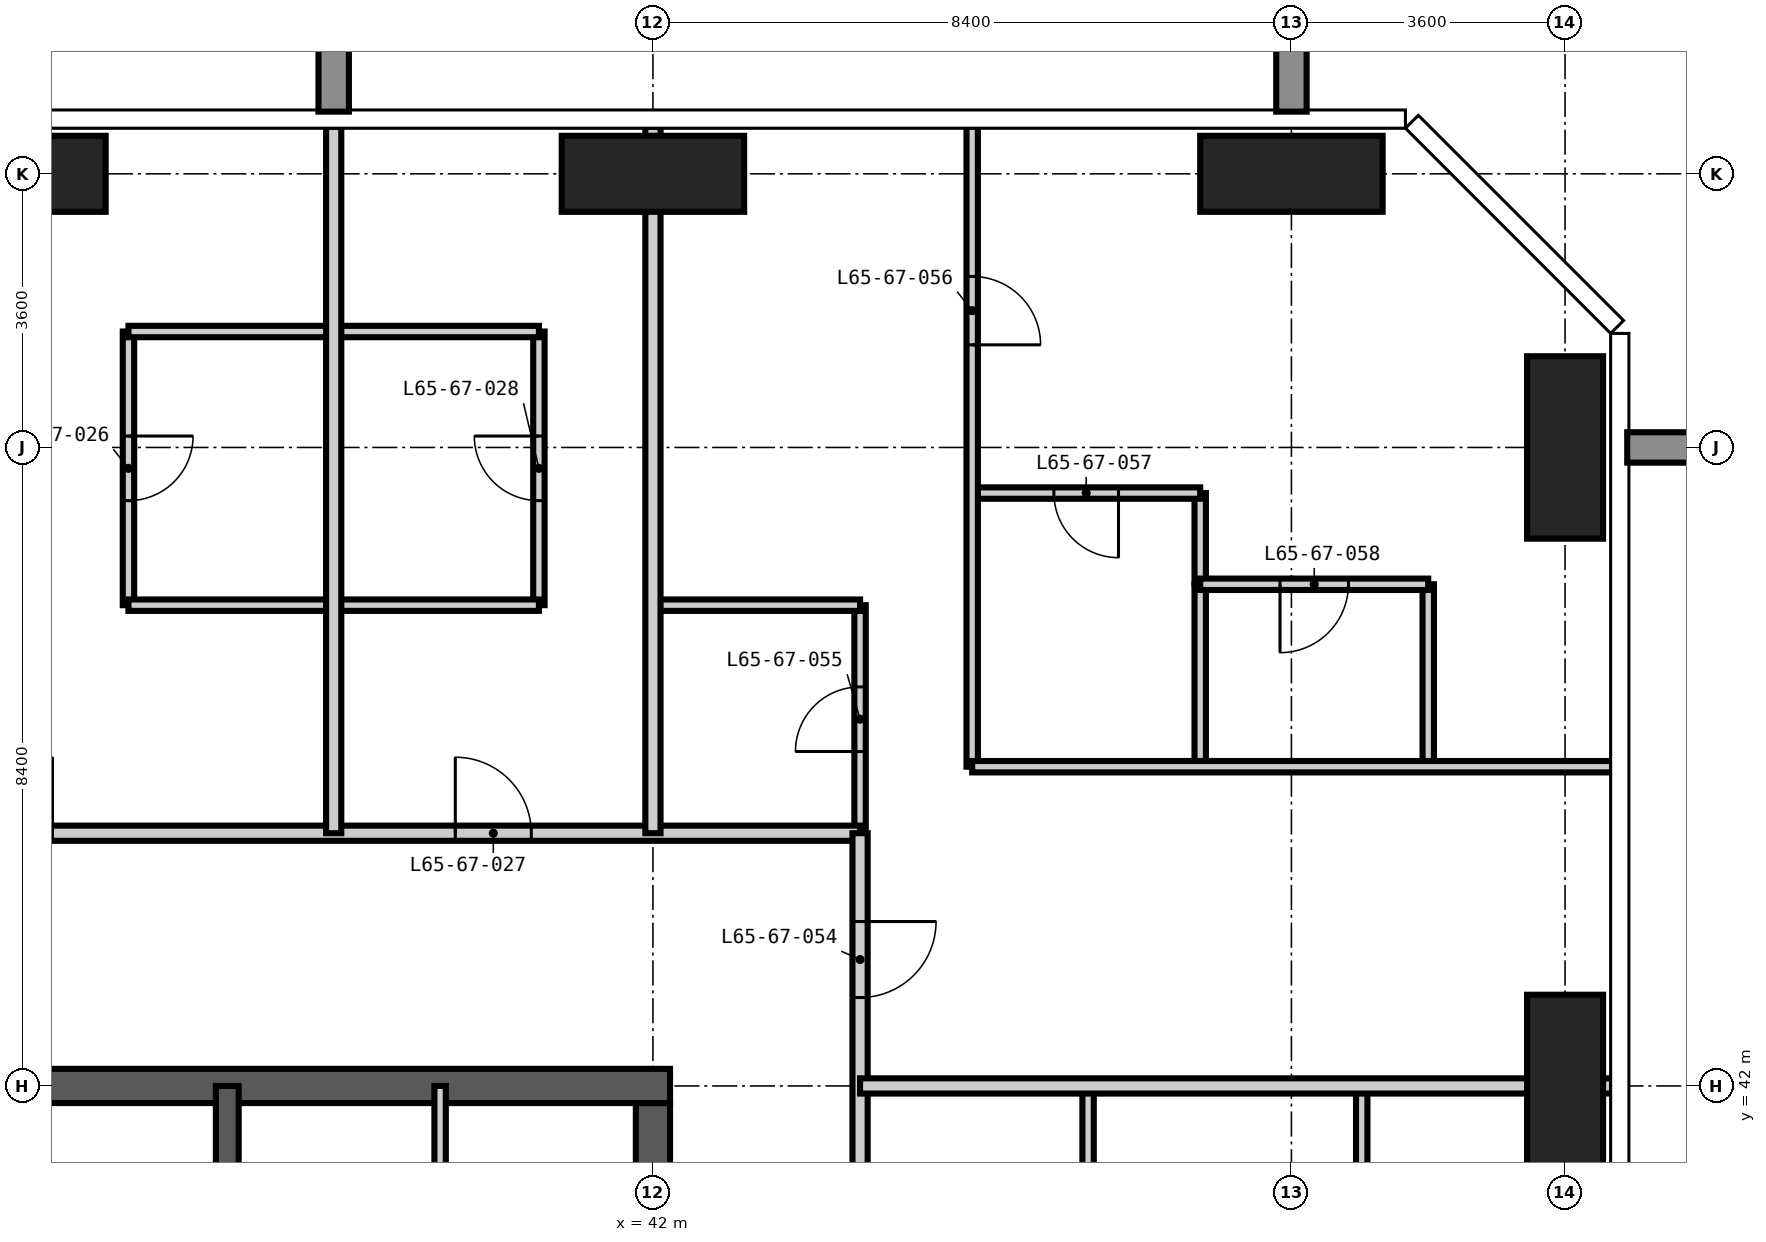
"""IFC4 building model, lengths in metres.
Left out: names, types, materials, properties, quantities, classifications, styles, units other than length and angle.
Written with IfcOpenShell. Run it as: python <this file> out.ifc"""

import sys

from ifc_helpers import new_model, si_unit, direction, frame, frame_2d, origin, origin_2d, place, context, subcontext, project, spatial, rectangle, extrude, element, fill, save


model = new_model("IFC4")
c1 = context("Model", 3, precision=1e-05, world=origin(), true_north=direction((0.0, 1.0)))
c2 = subcontext(c1, "Body", "Model", "MODEL_VIEW")
j1 = project(units=[si_unit("LENGTHUNIT", "METRE"), si_unit("PLANEANGLEUNIT", "RADIAN")], contexts=[c1])
p1 = place(None, origin())
s1 = spatial("IfcSite", under=j1, at=p1, CompositionType="ELEMENT")
p2 = place(p1, origin())
s2 = spatial("IfcBuilding", under=s1, at=p2, CompositionType="ELEMENT")
p3 = place(p2, frame((0.0, 0.0, 252.9)))
s3 = spatial("IfcBuildingStorey", under=s2, at=p3, CompositionType="ELEMENT", Elevation=252.9)
for number, where, z_axis, x_axis in (
    (1, (33.6, 54.0, -0.35), (0.0, 0.0, 1.0), (1.0, 0.0, 0.0)),
    (2, (42.0, 54.0, -0.35), (0.0, 0.0, 1.0), (1.0, 0.0, 0.0)),
    (3, (50.4, 54.0, -0.35), (0.0, 0.0, 1.0), (1.0, 0.0, 0.0)),
):
    element("IfcColumn", number, at=place(p3, frame(where, z_axis=z_axis, x_axis=x_axis)), inside=s3, PredefinedType="COLUMN", context=c2, shape_type="SweptSolid", body=[
        extrude(rectangle(XDim=2.4, YDim=1.0, at=origin_2d()), origin(), (0.0, 0.0, 1.0), 3.9),
    ])
for number, where, z_axis, x_axis in (
    (4, (54.0, 42.0, -0.35), (0.0, 0.0, 1.0), (1.0, 0.0, 0.0)),
    (5, (54.0, 50.4, -0.35), (0.0, 0.0, 1.0), (1.0, 0.0, 0.0)),
):
    element("IfcColumn", number, at=place(p3, frame(where, z_axis=z_axis, x_axis=x_axis)), inside=s3, PredefinedType="COLUMN", context=c2, shape_type="SweptSolid", body=[
        extrude(rectangle(XDim=1.0, YDim=2.4, at=origin_2d()), origin(), (0.0, 0.0, 1.0), 3.9),
    ])
p4 = place(p3, frame((42.0, 17.025, -0.35), z_axis=(0.0, 0.0, 1.0), x_axis=(0.0, 1.0, 0.0)))
e6 = element("IfcWall", 6, at=p4, inside=s3, PredefinedType="SHEAR", context=c2, shape_type="SweptSolid", body=[
    extrude(rectangle(XDim=24.75, YDim=0.45, at=frame_2d((12.375, 0.0))), origin(), (0.0, 0.0, 1.0), 3.9),
])
p5 = place(p4, frame((0.575, 0.0, 0.35)))
e7 = element("IfcOpeningElement", 7, at=p5, cuts=e6, PredefinedType="OPENING", context=c2, shape_type="SweptSolid", body=[
    extrude(rectangle(XDim=1.2, YDim=2.2, at=frame_2d((0.6, 1.1))), frame((0.0, 0.235, 0.0), z_axis=(0.0, -1.0, 0.0), x_axis=(1.0, 0.0, 0.0)), (0.0, 0.0, 1.0), 0.47),
])
p6 = place(p4, frame((11.475, 0.0, 0.35)))
e8 = element("IfcOpeningElement", 8, at=p6, cuts=e6, PredefinedType="OPENING", context=c2, shape_type="SweptSolid", body=[
    extrude(rectangle(XDim=1.8, YDim=2.2, at=frame_2d((0.9, 1.1))), frame((0.0, 0.235, 0.0), z_axis=(0.0, -1.0, 0.0), x_axis=(1.0, 0.0, 0.0)), (0.0, 0.0, 1.0), 0.47),
])
p7 = place(p4, frame((20.275, 0.0, 0.35)))
e9 = element("IfcOpeningElement", 9, at=p7, cuts=e6, PredefinedType="OPENING", context=c2, shape_type="SweptSolid", body=[
    extrude(rectangle(XDim=1.0, YDim=2.1, at=frame_2d((0.5, 1.05))), frame((0.0, 0.235, 0.0), z_axis=(0.0, -1.0, 0.0), x_axis=(1.0, 0.0, 0.0)), (0.0, 0.0, 1.0), 0.47),
])
p8 = place(p3, frame((42.225, 42.0, -0.35), z_axis=(0.0, 0.0, 1.0), x_axis=(-1.0, 0.0, 0.0)))
e10 = element("IfcWall", 10, at=p8, inside=s3, PredefinedType="SHEAR", context=c2, shape_type="SweptSolid", body=[
    extrude(rectangle(XDim=17.25, YDim=0.45, at=frame_2d((8.625, 0.0))), origin(), (0.0, 0.0, 1.0), 3.9),
])
p9 = place(p8, frame((10.125, 0.0, 0.35)))
e11 = element("IfcOpeningElement", 11, at=p9, cuts=e10, PredefinedType="OPENING", context=c2, shape_type="SweptSolid", body=[
    extrude(rectangle(XDim=1.2, YDim=2.2, at=frame_2d((0.6, 1.1))), frame((0.0, 0.235, 0.0), z_axis=(0.0, -1.0, 0.0), x_axis=(1.0, 0.0, 0.0)), (0.0, 0.0, 1.0), 0.47),
])
p10 = place(p3, frame((36.4, 33.6, -0.35), z_axis=(0.0, 0.0, 1.0), x_axis=(0.0, 1.0, 0.0)))
e12 = element("IfcWall", 12, at=p10, inside=s3, PredefinedType="SHEAR", context=c2, shape_type="SweptSolid", body=[
    extrude(rectangle(XDim=8.4, YDim=0.3, at=frame_2d((4.2, 0.0))), origin(), (0.0, 0.0, 1.0), 3.9),
])
p11 = place(p3, frame((35.1, 48.325, 0.0), z_axis=(0.0, 0.0, 1.0), x_axis=(0.0, 1.0, 0.0)))
e13 = element("IfcWall", 13, at=p11, inside=s3, PredefinedType="PARTITIONING", context=c2, shape_type="SweptSolid", body=[
    extrude(rectangle(XDim=3.6, YDim=0.15, at=frame_2d((1.8, 0.0))), origin(), (0.0, 0.0, 1.0), 3.55),
])
p12 = place(p11, frame((1.375, 0.0, 0.0)))
e14 = element("IfcOpeningElement", 14, at=p12, cuts=e13, PredefinedType="OPENING", context=c2, shape_type="SweptSolid", body=[
    extrude(rectangle(XDim=0.85, YDim=2.1, at=frame_2d((0.425, 1.05))), frame((0.0, 0.085, 0.0), z_axis=(0.0, -1.0, 0.0), x_axis=(1.0, 0.0, 0.0)), (0.0, 0.0, 1.0), 0.17),
])
p13 = place(p3, frame((40.5, 48.325, 0.0), z_axis=(0.0, 0.0, 1.0), x_axis=(0.0, 1.0, 0.0)))
e15 = element("IfcWall", 15, at=p13, inside=s3, PredefinedType="PARTITIONING", context=c2, shape_type="SweptSolid", body=[
    extrude(rectangle(XDim=3.6, YDim=0.15, at=frame_2d((1.8, 0.0))), origin(), (0.0, 0.0, 1.0), 3.55),
])
p14 = place(p13, frame((1.375, 0.0, 0.0)))
e16 = element("IfcOpeningElement", 16, at=p14, cuts=e15, PredefinedType="OPENING", context=c2, shape_type="SweptSolid", body=[
    extrude(rectangle(XDim=0.85, YDim=2.1, at=frame_2d((0.425, 1.05))), frame((0.0, 0.085, 0.0), z_axis=(0.0, -1.0, 0.0), x_axis=(1.0, 0.0, 0.0)), (0.0, 0.0, 1.0), 0.17),
])
p15 = place(p3, frame((44.725, 45.325, 0.0), z_axis=(0.0, 0.0, 1.0), x_axis=(0.0, 1.0, 0.0)))
e17 = element("IfcWall", 17, at=p15, inside=s3, PredefinedType="PARTITIONING", context=c2, shape_type="SweptSolid", body=[
    extrude(rectangle(XDim=3.0, YDim=0.15, at=frame_2d((1.5, 0.0))), origin(), (0.0, 0.0, 1.0), 3.55),
])
p16 = place(p15, frame((1.075, 0.0, 0.0)))
e18 = element("IfcOpeningElement", 18, at=p16, cuts=e17, PredefinedType="OPENING", context=c2, shape_type="SweptSolid", body=[
    extrude(rectangle(XDim=0.85, YDim=2.1, at=frame_2d((0.425, 1.05))), frame((0.0, 0.085, 0.0), z_axis=(0.0, -1.0, 0.0), x_axis=(1.0, 0.0, 0.0)), (0.0, 0.0, 1.0), 0.17),
])
p17 = place(p3, frame((47.725, 39.3, 0.0), z_axis=(0.0, 0.0, 1.0), x_axis=(0.0, 1.0, 0.0)))
e19 = element("IfcWall", 19, at=p17, inside=s3, PredefinedType="PARTITIONING", context=c2, shape_type="SweptSolid", body=[
    extrude(rectangle(XDim=2.7, YDim=0.15, at=frame_2d((1.35, 0.0))), origin(), (0.0, 0.0, 1.0), 3.55),
])
p18 = place(p3, frame((49.2, 48.6, 0.0), z_axis=(0.0, 0.0, 1.0), x_axis=(0.0, 1.0, 0.0)))
e20 = element("IfcWall", 20, at=p18, inside=s3, PredefinedType="PARTITIONING", context=c2, shape_type="SweptSolid", body=[
    extrude(rectangle(XDim=1.2, YDim=0.15, at=frame_2d((0.6, 0.0))), origin(), (0.0, 0.0, 1.0), 3.55),
])
p19 = place(p3, frame((51.325, 39.3, 0.0), z_axis=(0.0, 0.0, 1.0), x_axis=(0.0, 1.0, 0.0)))
e21 = element("IfcWall", 21, at=p19, inside=s3, PredefinedType="PARTITIONING", context=c2, shape_type="SweptSolid", body=[
    extrude(rectangle(XDim=2.7, YDim=0.15, at=frame_2d((1.35, 0.0))), origin(), (0.0, 0.0, 1.0), 3.55),
])
p20 = place(p3, frame((35.1, 48.325, 0.0), z_axis=(0.0, 0.0, 1.0), x_axis=(1.0, 0.0, 0.0)))
e22 = element("IfcWall", 22, at=p20, inside=s3, PredefinedType="PARTITIONING", context=c2, shape_type="SweptSolid", body=[
    extrude(rectangle(XDim=5.4, YDim=0.15, at=frame_2d((2.7, 0.0))), origin(), (0.0, 0.0, 1.0), 3.55),
])
p21 = place(p3, frame((42.0, 48.325, 0.0), z_axis=(0.0, 0.0, 1.0), x_axis=(1.0, 0.0, 0.0)))
e23 = element("IfcWall", 23, at=p21, inside=s3, PredefinedType="PARTITIONING", context=c2, shape_type="SweptSolid", body=[
    extrude(rectangle(XDim=2.725, YDim=0.15, at=frame_2d((1.363, 0.0))), origin(), (0.0, 0.0, 1.0), 3.55),
])
p22 = place(p3, frame((46.2, 49.8, 0.0), z_axis=(0.0, 0.0, 1.0), x_axis=(1.0, 0.0, 0.0)))
e24 = element("IfcWall", 24, at=p22, inside=s3, PredefinedType="PARTITIONING", context=c2, shape_type="SweptSolid", body=[
    extrude(rectangle(XDim=3.0, YDim=0.15, at=frame_2d((1.5, 0.0))), origin(), (0.0, 0.0, 1.0), 3.55),
])
p23 = place(p22, frame((1.075, 0.0, 0.0)))
e25 = element("IfcOpeningElement", 25, at=p23, cuts=e24, PredefinedType="OPENING", context=c2, shape_type="SweptSolid", body=[
    extrude(rectangle(XDim=0.85, YDim=2.1, at=frame_2d((0.425, 1.05))), frame((0.0, 0.085, 0.0), z_axis=(0.0, -1.0, 0.0), x_axis=(1.0, 0.0, 0.0)), (0.0, 0.0, 1.0), 0.17),
])
p24 = place(p3, frame((35.1, 51.925, 0.0), z_axis=(0.0, 0.0, 1.0), x_axis=(1.0, 0.0, 0.0)))
e26 = element("IfcWall", 26, at=p24, inside=s3, PredefinedType="PARTITIONING", context=c2, shape_type="SweptSolid", body=[
    extrude(rectangle(XDim=5.4, YDim=0.15, at=frame_2d((2.7, 0.0))), origin(), (0.0, 0.0, 1.0), 3.55),
])
p25 = place(p3, frame((23.075, 45.325, 0.0), z_axis=(0.0, 0.0, 1.0), x_axis=(1.0, 0.0, 0.0)))
e27 = element("IfcWall", 27, at=p25, inside=s3, PredefinedType="PARTITIONING", context=c2, shape_type="SweptSolid", body=[
    extrude(rectangle(XDim=21.65, YDim=0.2, at=frame_2d((10.825, 0.0))), origin(), (0.0, 0.0, 1.0), 3.55),
])
p26 = place(p25, frame((3.725, 0.0, 0.0)))
e28 = element("IfcOpeningElement", 28, at=p26, cuts=e27, PredefinedType="OPENING", context=c2, shape_type="SweptSolid", body=[
    extrude(rectangle(XDim=1.0, YDim=2.2, at=frame_2d((0.5, 1.1))), frame((0.0, 0.11, 0.0), z_axis=(0.0, -1.0, 0.0), x_axis=(1.0, 0.0, 0.0)), (0.0, 0.0, 1.0), 0.22),
])
p27 = place(p25, frame((10.025, 0.0, 0.0)))
e29 = element("IfcOpeningElement", 29, at=p27, cuts=e27, PredefinedType="OPENING", context=c2, shape_type="SweptSolid", body=[
    extrude(rectangle(XDim=1.0, YDim=2.2, at=frame_2d((0.5, 1.1))), frame((0.0, 0.11, 0.0), z_axis=(0.0, -1.0, 0.0), x_axis=(1.0, 0.0, 0.0)), (0.0, 0.0, 1.0), 0.22),
])
p28 = place(p25, frame((16.325, 0.0, 0.0)))
e30 = element("IfcOpeningElement", 30, at=p28, cuts=e27, PredefinedType="OPENING", context=c2, shape_type="SweptSolid", body=[
    extrude(rectangle(XDim=1.0, YDim=2.2, at=frame_2d((0.5, 1.1))), frame((0.0, 0.11, 0.0), z_axis=(0.0, -1.0, 0.0), x_axis=(1.0, 0.0, 0.0)), (0.0, 0.0, 1.0), 0.22),
])
p29 = place(p3, frame((44.725, 45.325, 0.0), z_axis=(0.0, 0.0, 1.0), x_axis=(0.0, -1.0, 0.0)))
e31 = element("IfcWall", 31, at=p29, inside=s3, PredefinedType="PARTITIONING", context=c2, shape_type="SweptSolid", body=[
    extrude(rectangle(XDim=11.725, YDim=0.2, at=frame_2d((5.862, 0.0))), origin(), (0.0, 0.0, 1.0), 3.55),
])
p30 = place(p29, frame((9.125, 0.0, 0.0)))
e32 = element("IfcOpeningElement", 32, at=p30, cuts=e31, PredefinedType="OPENING", context=c2, shape_type="SweptSolid", body=[
    extrude(rectangle(XDim=1.0, YDim=2.2, at=frame_2d((0.5, 1.1))), frame((0.0, 0.11, 0.0), z_axis=(0.0, -1.0, 0.0), x_axis=(1.0, 0.0, 0.0)), (0.0, 0.0, 1.0), 0.22),
])
p31 = place(p29, frame((4.925, 0.0, 0.0)))
e33 = element("IfcOpeningElement", 33, at=p31, cuts=e31, PredefinedType="OPENING", context=c2, shape_type="SweptSolid", body=[
    extrude(rectangle(XDim=1.0, YDim=2.2, at=frame_2d((0.5, 1.1))), frame((0.0, 0.11, 0.0), z_axis=(0.0, -1.0, 0.0), x_axis=(1.0, 0.0, 0.0)), (0.0, 0.0, 1.0), 0.22),
])
p32 = place(p29, frame((1.162, 0.0, 0.0)))
e34 = element("IfcOpeningElement", 34, at=p32, cuts=e31, PredefinedType="OPENING", context=c2, shape_type="SweptSolid", body=[
    extrude(rectangle(XDim=1.0, YDim=2.2, at=frame_2d((0.5, 1.1))), frame((0.0, 0.11, 0.0), z_axis=(0.0, -1.0, 0.0), x_axis=(1.0, 0.0, 0.0)), (0.0, 0.0, 1.0), 0.22),
])
for number, where, z_axis, x_axis in (
    (35, (37.8, 45.325, 0.0), (0.0, 0.0, 1.0), (0.0, 1.0, 0.0)),
    (36, (42.0, 45.325, 0.0), (0.0, 0.0, 1.0), (0.0, 1.0, 0.0)),
):
    element("IfcWall", number, at=place(p3, frame(where, z_axis=z_axis, x_axis=x_axis)), inside=s3, PredefinedType="PARTITIONING", context=c2, shape_type="SweptSolid", body=[
        extrude(rectangle(XDim=9.293, YDim=0.2, at=frame_2d((4.646, 0.0))), origin(), (0.0, 0.0, 1.0), 3.55),
    ])
p33 = place(p3, frame((44.725, 42.0, 0.0), z_axis=(0.0, 0.0, 1.0), x_axis=(1.0, 0.0, 0.0)))
e37 = element("IfcWall", 37, at=p33, inside=s3, PredefinedType="PARTITIONING", context=c2, shape_type="SweptSolid", body=[
    extrude(rectangle(XDim=9.893, YDim=0.2, at=frame_2d((4.946, 0.0))), origin(), (0.0, 0.0, 1.0), 3.55),
])
p34 = place(p3, frame((39.2, 33.6, 0.0), z_axis=(0.0, 0.0, 1.0), x_axis=(0.0, 1.0, 0.0)))
e38 = element("IfcWall", 38, at=p34, inside=s3, PredefinedType="PARTITIONING", context=c2, shape_type="SweptSolid", body=[
    extrude(rectangle(XDim=8.4, YDim=0.15, at=frame_2d((4.2, 0.0))), origin(), (0.0, 0.0, 1.0), 3.55),
])
p35 = place(p34, frame((3.7, 0.0, 0.0)))
e39 = element("IfcOpeningElement", 39, at=p35, cuts=e38, PredefinedType="OPENING", context=c2, shape_type="SweptSolid", body=[
    extrude(rectangle(XDim=1.0, YDim=2.1, at=frame_2d((0.5, 1.05))), frame((0.0, 0.085, 0.0), z_axis=(0.0, -1.0, 0.0), x_axis=(1.0, 0.0, 0.0)), (0.0, 0.0, 1.0), 0.17),
])
p36 = place(p3, frame((46.2, 46.2, 0.0), z_axis=(0.0, 0.0, 1.0), x_axis=(0.0, 1.0, 0.0)))
e40 = element("IfcWall", 40, at=p36, inside=s3, PredefinedType="PARTITIONING", context=c2, shape_type="SweptSolid", body=[
    extrude(rectangle(XDim=8.418, YDim=0.15, at=frame_2d((4.209, 0.0))), origin(), (0.0, 0.0, 1.0), 3.55),
])
p37 = place(p36, frame((5.55, 0.0, 0.0)))
e41 = element("IfcOpeningElement", 41, at=p37, cuts=e40, PredefinedType="OPENING", context=c2, shape_type="SweptSolid", body=[
    extrude(rectangle(XDim=0.9, YDim=2.1, at=frame_2d((0.45, 1.05))), frame((0.0, 0.085, 0.0), z_axis=(0.0, -1.0, 0.0), x_axis=(1.0, 0.0, 0.0)), (0.0, 0.0, 1.0), 0.17),
])
for number, where, z_axis, x_axis in (
    (42, (49.2, 46.2, 0.0), (0.0, 0.0, 1.0), (0.0, 1.0, 0.0)),
    (43, (52.2, 46.2, 0.0), (0.0, 0.0, 1.0), (0.0, 1.0, 0.0)),
):
    element("IfcWall", number, at=place(p3, frame(where, z_axis=z_axis, x_axis=x_axis)), inside=s3, PredefinedType="PARTITIONING", context=c2, shape_type="SweptSolid", body=[
        extrude(rectangle(XDim=2.4, YDim=0.15, at=frame_2d((1.2, 0.0))), origin(), (0.0, 0.0, 1.0), 3.55),
    ])
p38 = place(p3, frame((46.2, 46.2, 0.0), z_axis=(0.0, 0.0, 1.0), x_axis=(1.0, 0.0, 0.0)))
e44 = element("IfcWall", 44, at=p38, inside=s3, PredefinedType="PARTITIONING", context=c2, shape_type="SweptSolid", body=[
    extrude(rectangle(XDim=8.418, YDim=0.15, at=frame_2d((4.209, 0.0))), origin(), (0.0, 0.0, 1.0), 3.55),
])
p39 = place(p3, frame((49.2, 48.6, 0.0), z_axis=(0.0, 0.0, 1.0), x_axis=(1.0, 0.0, 0.0)))
e45 = element("IfcWall", 45, at=p39, inside=s3, PredefinedType="PARTITIONING", context=c2, shape_type="SweptSolid", body=[
    extrude(rectangle(XDim=3.0, YDim=0.15, at=frame_2d((1.5, 0.0))), origin(), (0.0, 0.0, 1.0), 3.55),
])
p40 = place(p39, frame((1.05, 0.0, 0.0)))
e46 = element("IfcOpeningElement", 46, at=p40, cuts=e45, PredefinedType="OPENING", context=c2, shape_type="SweptSolid", body=[
    extrude(rectangle(XDim=0.9, YDim=2.1, at=frame_2d((0.45, 1.05))), frame((0.0, 0.085, 0.0), z_axis=(0.0, -1.0, 0.0), x_axis=(1.0, 0.0, 0.0)), (0.0, 0.0, 1.0), 0.17),
])
p41 = place(p12, frame((0.85, 0.0, 0.0), z_axis=(0.0, 0.0, 1.0), x_axis=(-1.0, 0.0, 0.0)))
e47 = element("IfcDoor", 47, at=p41, inside=s3, OperationType="SINGLE_SWING_LEFT", PredefinedType="DOOR", context=c2, shape_type="SweptSolid", body=[
    extrude(rectangle(XDim=0.85, YDim=2.1, at=frame_2d((0.425, 1.05))), frame((0.0, 0.025, 0.0), z_axis=(0.0, -1.0, 0.0), x_axis=(1.0, 0.0, 0.0)), (0.0, 0.0, 1.0), 0.05),
])
fill(e14, e47)
p42 = place(p28, origin())
e48 = element("IfcDoor", 48, at=p42, inside=s3, OperationType="SINGLE_SWING_LEFT", PredefinedType="DOOR", context=c2, shape_type="SweptSolid", body=[
    extrude(rectangle(XDim=1.0, YDim=2.2, at=frame_2d((0.5, 1.1))), frame((0.0, 0.025, 0.0), z_axis=(0.0, -1.0, 0.0), x_axis=(1.0, 0.0, 0.0)), (0.0, 0.0, 1.0), 0.05),
])
fill(e30, e48)
p43 = place(p14, origin())
e49 = element("IfcDoor", 49, at=p43, inside=s3, OperationType="SINGLE_SWING_RIGHT", PredefinedType="DOOR", context=c2, shape_type="SweptSolid", body=[
    extrude(rectangle(XDim=0.85, YDim=2.1, at=frame_2d((0.425, 1.05))), frame((0.0, 0.025, 0.0), z_axis=(0.0, -1.0, 0.0), x_axis=(1.0, 0.0, 0.0)), (0.0, 0.0, 1.0), 0.05),
])
fill(e16, e49)
p44 = place(p32, origin())
e50 = element("IfcDoor", 50, at=p44, inside=s3, OperationType="SINGLE_SWING_LEFT", PredefinedType="DOOR", context=c2, shape_type="SweptSolid", body=[
    extrude(rectangle(XDim=1.0, YDim=2.2, at=frame_2d((0.5, 1.1))), frame((0.0, 0.025, 0.0), z_axis=(0.0, -1.0, 0.0), x_axis=(1.0, 0.0, 0.0)), (0.0, 0.0, 1.0), 0.05),
])
fill(e34, e50)
p45 = place(p16, origin())
e51 = element("IfcDoor", 51, at=p45, inside=s3, OperationType="SINGLE_SWING_LEFT", PredefinedType="DOOR", context=c2, shape_type="SweptSolid", body=[
    extrude(rectangle(XDim=0.85, YDim=2.1, at=frame_2d((0.425, 1.05))), frame((0.0, 0.025, 0.0), z_axis=(0.0, -1.0, 0.0), x_axis=(1.0, 0.0, 0.0)), (0.0, 0.0, 1.0), 0.05),
])
fill(e18, e51)
p46 = place(p37, frame((0.9, 0.0, 0.0), z_axis=(0.0, 0.0, 1.0), x_axis=(-1.0, 0.0, 0.0)))
e52 = element("IfcDoor", 52, at=p46, inside=s3, OperationType="SINGLE_SWING_RIGHT", PredefinedType="DOOR", context=c2, shape_type="SweptSolid", body=[
    extrude(rectangle(XDim=0.9, YDim=2.1, at=frame_2d((0.45, 1.05))), frame((0.0, 0.025, 0.0), z_axis=(0.0, -1.0, 0.0), x_axis=(1.0, 0.0, 0.0)), (0.0, 0.0, 1.0), 0.05),
])
fill(e41, e52)
p47 = place(p23, frame((0.85, 0.0, 0.0), z_axis=(0.0, 0.0, 1.0), x_axis=(-1.0, 0.0, 0.0)))
e53 = element("IfcDoor", 53, at=p47, inside=s3, OperationType="SINGLE_SWING_LEFT", PredefinedType="DOOR", context=c2, shape_type="SweptSolid", body=[
    extrude(rectangle(XDim=0.85, YDim=2.1, at=frame_2d((0.425, 1.05))), frame((0.0, 0.025, 0.0), z_axis=(0.0, -1.0, 0.0), x_axis=(1.0, 0.0, 0.0)), (0.0, 0.0, 1.0), 0.05),
])
fill(e25, e53)
p48 = place(p40, frame((0.9, 0.0, 0.0), z_axis=(0.0, 0.0, 1.0), x_axis=(-1.0, 0.0, 0.0)))
e54 = element("IfcDoor", 54, at=p48, inside=s3, OperationType="SINGLE_SWING_RIGHT", PredefinedType="DOOR", context=c2, shape_type="SweptSolid", body=[
    extrude(rectangle(XDim=0.9, YDim=2.1, at=frame_2d((0.45, 1.05))), frame((0.0, 0.025, 0.0), z_axis=(0.0, -1.0, 0.0), x_axis=(1.0, 0.0, 0.0)), (0.0, 0.0, 1.0), 0.05),
])
fill(e46, e54)
save(model, sys.argv[1])
